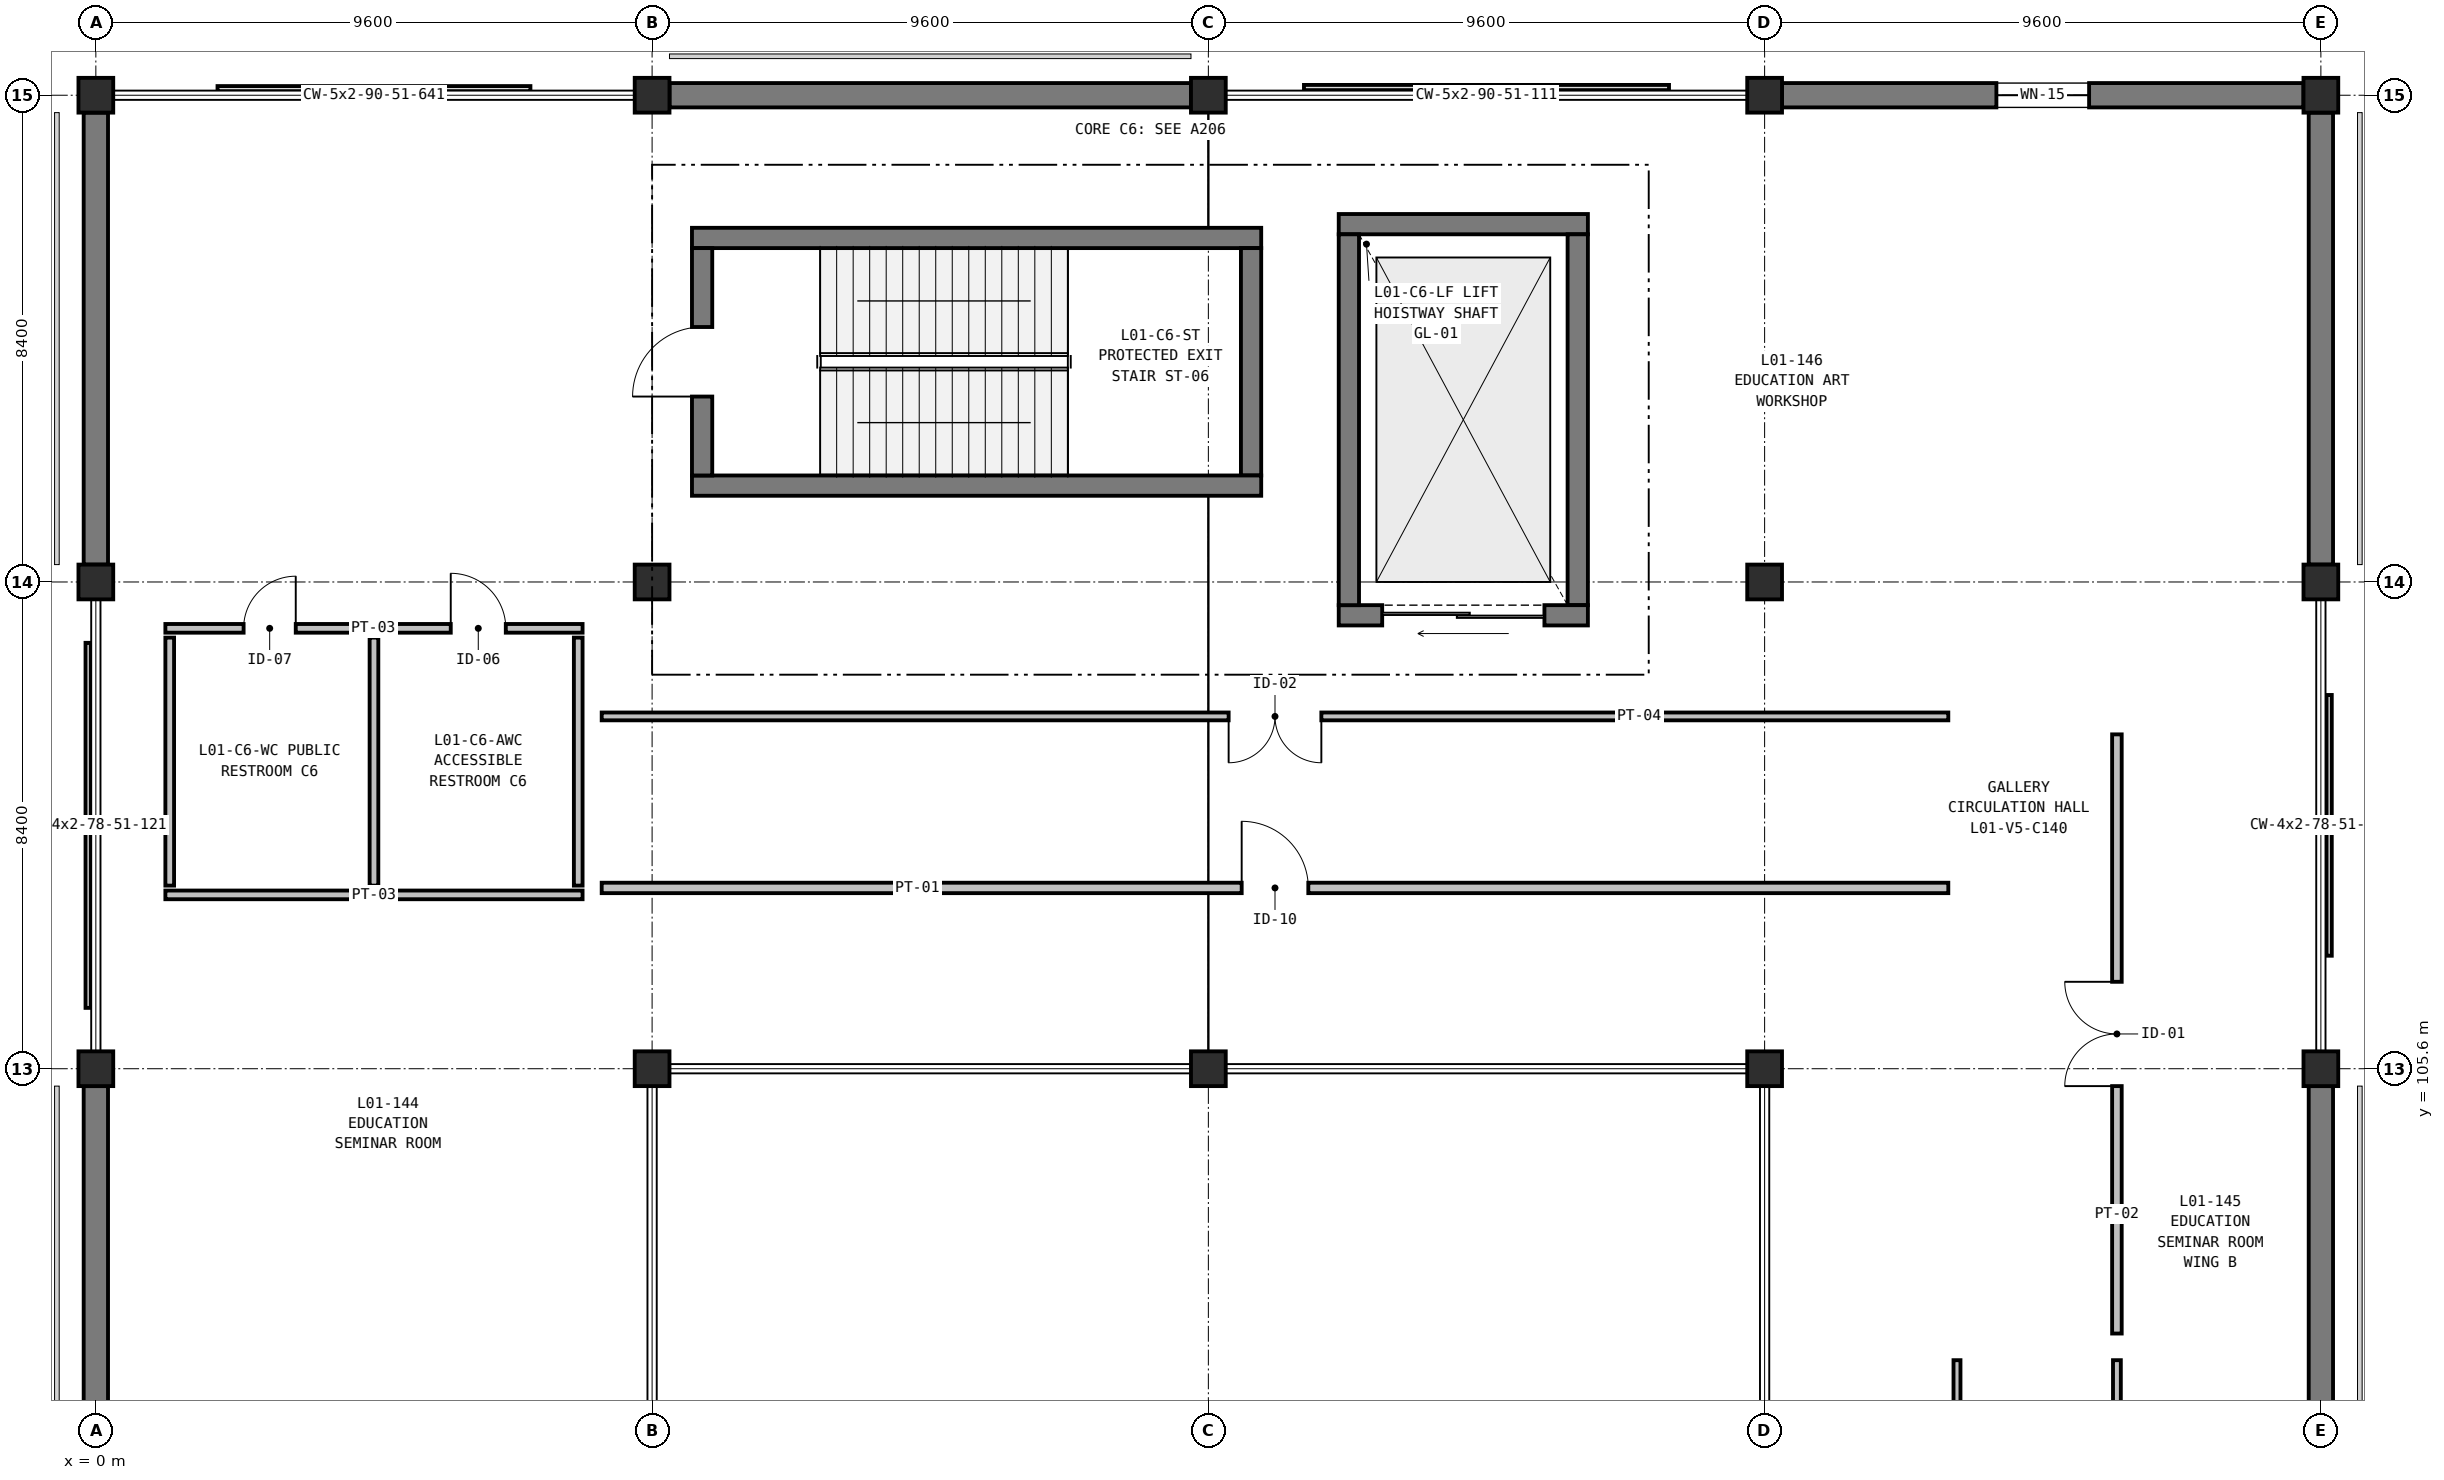
"""IFC4 building model, lengths in metres.
Left out: names, types, materials, properties, quantities, classifications, styles, units other than length and angle.
Written with IfcOpenShell. Run it as: python <this file> out.ifc"""

import sys

from ifc_helpers import new_model, si_unit, direction, frame, frame_2d, origin, origin_2d, place, context, subcontext, project, spatial, rectangle, extrude, element, fill, save


model = new_model("IFC4")
c1 = context("Model", 3, precision=1e-05, world=origin(), true_north=direction((0.0, 1.0)))
c2 = subcontext(c1, "Body", "Model", "MODEL_VIEW")
j1 = project(units=[si_unit("LENGTHUNIT", "METRE"), si_unit("PLANEANGLEUNIT", "RADIAN")], contexts=[c1])
p1 = place(None, origin())
s1 = spatial("IfcSite", under=j1, at=p1, CompositionType="ELEMENT")
p2 = place(p1, origin())
s2 = spatial("IfcBuilding", under=s1, at=p2, CompositionType="ELEMENT")
p3 = place(p2, frame((0.0, 0.0, 6.0)))
s3 = spatial("IfcBuildingStorey", under=s2, at=p3, CompositionType="ELEMENT", Elevation=6.0)
for number, where, z_axis, x_axis in (
    (1, (0.0, 105.6, 0.0), (0.0, 0.0, 1.0), (1.0, 0.0, 0.0)),
    (2, (0.0, 114.0, 0.0), (0.0, 0.0, 1.0), (1.0, 0.0, 0.0)),
    (3, (0.0, 122.4, 0.0), (0.0, 0.0, 1.0), (1.0, 0.0, 0.0)),
    (4, (9.6, 105.6, 0.0), (0.0, 0.0, 1.0), (1.0, 0.0, 0.0)),
    (5, (9.6, 114.0, 0.0), (0.0, 0.0, 1.0), (1.0, 0.0, 0.0)),
    (6, (9.6, 122.4, 0.0), (0.0, 0.0, 1.0), (1.0, 0.0, 0.0)),
    (7, (19.2, 105.6, 0.0), (0.0, 0.0, 1.0), (1.0, 0.0, 0.0)),
    (8, (19.2, 122.4, 0.0), (0.0, 0.0, 1.0), (1.0, 0.0, 0.0)),
    (9, (28.8, 105.6, 0.0), (0.0, 0.0, 1.0), (1.0, 0.0, 0.0)),
    (10, (28.8, 114.0, 0.0), (0.0, 0.0, 1.0), (1.0, 0.0, 0.0)),
    (11, (28.8, 122.4, 0.0), (0.0, 0.0, 1.0), (1.0, 0.0, 0.0)),
    (12, (38.4, 105.6, 0.0), (0.0, 0.0, 1.0), (1.0, 0.0, 0.0)),
    (13, (38.4, 114.0, 0.0), (0.0, 0.0, 1.0), (1.0, 0.0, 0.0)),
    (14, (38.4, 122.4, 0.0), (0.0, 0.0, 1.0), (1.0, 0.0, 0.0)),
):
    element("IfcColumn", number, at=place(p3, frame(where, z_axis=z_axis, x_axis=x_axis)), inside=s3, PredefinedType="COLUMN", context=c2, shape_type="SweptSolid", body=[
        extrude(rectangle(XDim=0.6, YDim=0.6, at=origin_2d()), origin(), (0.0, 0.0, 1.0), 5.4),
    ])
p4 = place(p3, frame((9.9, 122.4, 0.0), z_axis=(0.0, 0.0, 1.0), x_axis=(1.0, 0.0, 0.0)))
e15 = element("IfcWall", 15, at=p4, inside=s3, PredefinedType="SOLIDWALL", context=c2, shape_type="SweptSolid", body=[
    extrude(rectangle(XDim=9.0, YDim=0.42, at=frame_2d((4.5, 0.0))), origin(), (0.0, 0.0, 1.0), 5.08),
])
p5 = place(p3, frame((29.1, 122.4, 0.0), z_axis=(0.0, 0.0, 1.0), x_axis=(1.0, 0.0, 0.0)))
e16 = element("IfcWall", 16, at=p5, inside=s3, PredefinedType="SOLIDWALL", context=c2, shape_type="SweptSolid", body=[
    extrude(rectangle(XDim=9.0, YDim=0.42, at=frame_2d((4.5, 0.0))), origin(), (0.0, 0.0, 1.0), 5.08),
])
p6 = place(p5, frame((3.7, 0.0, 0.9)))
e17 = element("IfcOpeningElement", 17, at=p6, cuts=e16, PredefinedType="OPENING", context=c2, shape_type="SweptSolid", body=[
    extrude(rectangle(XDim=1.6, YDim=2.25, at=frame_2d((0.8, 1.125))), frame((0.0, 0.22, 0.0), z_axis=(0.0, -1.0, 0.0), x_axis=(1.0, 0.0, 0.0)), (0.0, 0.0, 1.0), 0.44),
])
for number, where, z_axis, x_axis in (
    (18, (38.4, 122.1, 0.0), (0.0, 0.0, 1.0), (0.0, -1.0, 0.0)),
    (19, (38.4, 105.3, 0.0), (0.0, 0.0, 1.0), (0.0, -1.0, 0.0)),
    (20, (0.0, 97.5, 0.0), (0.0, 0.0, 1.0), (0.0, 1.0, 0.0)),
    (21, (0.0, 114.3, 0.0), (0.0, 0.0, 1.0), (0.0, 1.0, 0.0)),
):
    element("IfcWall", number, at=place(p3, frame(where, z_axis=z_axis, x_axis=x_axis)), inside=s3, PredefinedType="SOLIDWALL", context=c2, shape_type="SweptSolid", body=[
        extrude(rectangle(XDim=7.8, YDim=0.42, at=frame_2d((3.9, 0.0))), origin(), (0.0, 0.0, 1.0), 5.08),
    ])
p7 = place(p3, frame((10.288, 119.937, 0.0), z_axis=(0.0, 0.0, 1.0), x_axis=(1.0, 0.0, 0.0)))
e22 = element("IfcWall", 22, at=p7, inside=s3, PredefinedType="SHEAR", context=c2, shape_type="SweptSolid", body=[
    extrude(rectangle(XDim=9.824, YDim=0.35, at=frame_2d((4.912, 0.0))), origin(), (0.0, 0.0, 1.0), 5.08),
])
p8 = place(p3, frame((19.937, 119.762, 0.0), z_axis=(0.0, 0.0, 1.0), x_axis=(0.0, -1.0, 0.0)))
e23 = element("IfcWall", 23, at=p8, inside=s3, PredefinedType="SHEAR", context=c2, shape_type="SweptSolid", body=[
    extrude(rectangle(XDim=3.924, YDim=0.35, at=frame_2d((1.962, 0.0))), origin(), (0.0, 0.0, 1.0), 5.08),
])
p9 = place(p3, frame((20.112, 115.663, 0.0), z_axis=(0.0, 0.0, 1.0), x_axis=(-1.0, 0.0, 0.0)))
e24 = element("IfcWall", 24, at=p9, inside=s3, PredefinedType="SHEAR", context=c2, shape_type="SweptSolid", body=[
    extrude(rectangle(XDim=9.824, YDim=0.35, at=frame_2d((4.912, 0.0))), origin(), (0.0, 0.0, 1.0), 5.08),
])
p10 = place(p3, frame((10.463, 115.838, 0.0), z_axis=(0.0, 0.0, 1.0), x_axis=(0.0, 1.0, 0.0)))
e25 = element("IfcWall", 25, at=p10, inside=s3, PredefinedType="SHEAR", context=c2, shape_type="SweptSolid", body=[
    extrude(rectangle(XDim=3.924, YDim=0.35, at=frame_2d((1.962, 0.0))), origin(), (0.0, 0.0, 1.0), 5.08),
])
p11 = place(p10, frame((1.362, 0.0, 0.0)))
e26 = element("IfcOpeningElement", 26, at=p11, cuts=e25, PredefinedType="OPENING", context=c2, shape_type="SweptSolid", body=[
    extrude(rectangle(XDim=1.2, YDim=2.2, at=frame_2d((0.6, 1.1))), frame((0.0, 0.185, 0.0), z_axis=(0.0, -1.0, 0.0), x_axis=(1.0, 0.0, 0.0)), (0.0, 0.0, 1.0), 0.37),
])
p12 = place(p3, frame((21.45, 120.175, 0.0), z_axis=(0.0, 0.0, 1.0), x_axis=(1.0, 0.0, 0.0)))
e27 = element("IfcWall", 27, at=p12, inside=s3, PredefinedType="SHEAR", context=c2, shape_type="SweptSolid", body=[
    extrude(rectangle(XDim=4.3, YDim=0.35, at=frame_2d((2.15, 0.0))), origin(), (0.0, 0.0, 1.0), 5.08),
])
p13 = place(p3, frame((25.575, 120.0, 0.0), z_axis=(0.0, 0.0, 1.0), x_axis=(0.0, -1.0, 0.0)))
e28 = element("IfcWall", 28, at=p13, inside=s3, PredefinedType="SHEAR", context=c2, shape_type="SweptSolid", body=[
    extrude(rectangle(XDim=6.4, YDim=0.35, at=frame_2d((3.2, 0.0))), origin(), (0.0, 0.0, 1.0), 5.08),
])
p14 = place(p3, frame((25.75, 113.425, 0.0), z_axis=(0.0, 0.0, 1.0), x_axis=(-1.0, 0.0, 0.0)))
e29 = element("IfcWall", 29, at=p14, inside=s3, PredefinedType="SHEAR", context=c2, shape_type="SweptSolid", body=[
    extrude(rectangle(XDim=4.3, YDim=0.35, at=frame_2d((2.15, 0.0))), origin(), (0.0, 0.0, 1.0), 5.08),
])
p15 = place(p14, frame((0.75, 0.0, 0.0)))
e30 = element("IfcOpeningElement", 30, at=p15, cuts=e29, PredefinedType="OPENING", context=c2, shape_type="SweptSolid", body=[
    extrude(rectangle(XDim=2.8, YDim=2.7, at=frame_2d((1.4, 1.35))), frame((0.0, 0.185, 0.0), z_axis=(0.0, -1.0, 0.0), x_axis=(1.0, 0.0, 0.0)), (0.0, 0.0, 1.0), 0.37),
])
p16 = place(p3, frame((21.625, 113.6, 0.0), z_axis=(0.0, 0.0, 1.0), x_axis=(0.0, 1.0, 0.0)))
e31 = element("IfcWall", 31, at=p16, inside=s3, PredefinedType="SHEAR", context=c2, shape_type="SweptSolid", body=[
    extrude(rectangle(XDim=6.4, YDim=0.35, at=frame_2d((3.2, 0.0))), origin(), (0.0, 0.0, 1.0), 5.08),
])
p17 = place(p3, frame((1.2, 113.2, 0.0), z_axis=(0.0, 0.0, 1.0), x_axis=(1.0, 0.0, 0.0)))
e32 = element("IfcWall", 32, at=p17, inside=s3, PredefinedType="PARTITIONING", context=c2, shape_type="SweptSolid", body=[
    extrude(rectangle(XDim=7.2, YDim=0.15, at=frame_2d((3.6, 0.0))), origin(), (0.0, 0.0, 1.0), 5.08),
])
p18 = place(p17, frame((1.35, 0.0, 0.0)))
e33 = element("IfcOpeningElement", 33, at=p18, cuts=e32, PredefinedType="OPENING", context=c2, shape_type="SweptSolid", body=[
    extrude(rectangle(XDim=0.9, YDim=2.1, at=frame_2d((0.45, 1.05))), frame((0.0, 0.085, 0.0), z_axis=(0.0, -1.0, 0.0), x_axis=(1.0, 0.0, 0.0)), (0.0, 0.0, 1.0), 0.17),
])
p19 = place(p17, frame((4.925, 0.0, 0.0)))
e34 = element("IfcOpeningElement", 34, at=p19, cuts=e32, PredefinedType="OPENING", context=c2, shape_type="SweptSolid", body=[
    extrude(rectangle(XDim=0.95, YDim=2.15, at=frame_2d((0.475, 1.075))), frame((0.0, 0.085, 0.0), z_axis=(0.0, -1.0, 0.0), x_axis=(1.0, 0.0, 0.0)), (0.0, 0.0, 1.0), 0.17),
])
p20 = place(p3, frame((1.2, 108.6, 0.0), z_axis=(0.0, 0.0, 1.0), x_axis=(1.0, 0.0, 0.0)))
e35 = element("IfcWall", 35, at=p20, inside=s3, PredefinedType="PARTITIONING", context=c2, shape_type="SweptSolid", body=[
    extrude(rectangle(XDim=7.2, YDim=0.15, at=frame_2d((3.6, 0.0))), origin(), (0.0, 0.0, 1.0), 5.08),
])
for number, where, z_axis, x_axis in (
    (36, (1.275, 108.76, 0.0), (0.0, 0.0, 1.0), (0.0, 1.0, 0.0)),
    (37, (4.8, 108.76, 0.0), (0.0, 0.0, 1.0), (0.0, 1.0, 0.0)),
    (38, (8.325, 108.76, 0.0), (0.0, 0.0, 1.0), (0.0, 1.0, 0.0)),
):
    element("IfcWall", number, at=place(p3, frame(where, z_axis=z_axis, x_axis=x_axis)), inside=s3, PredefinedType="PARTITIONING", context=c2, shape_type="SweptSolid", body=[
        extrude(rectangle(XDim=4.28, YDim=0.15, at=frame_2d((2.14, 0.0))), origin(), (0.0, 0.0, 1.0), 4.455),
    ])
p21 = place(p3, frame((34.88, 90.23, 0.0), z_axis=(0.0, 0.0, 1.0), x_axis=(0.0, 1.0, 0.0)))
e39 = element("IfcWall", 39, at=p21, inside=s3, PredefinedType="PARTITIONING", context=c2, shape_type="SweptSolid", body=[
    extrude(rectangle(XDim=10.34, YDim=0.135, at=frame_2d((5.17, 0.0))), origin(), (0.0, 0.0, 1.0), 4.305),
])
p22 = place(p21, frame((3.97, 0.0, 0.0)))
e40 = element("IfcOpeningElement", 40, at=p22, cuts=e39, PredefinedType="OPENING", context=c2, shape_type="SweptSolid", body=[
    extrude(rectangle(XDim=2.4, YDim=2.6, at=frame_2d((1.2, 1.3))), frame((0.0, 0.077, 0.0), z_axis=(0.0, -1.0, 0.0), x_axis=(1.0, 0.0, 0.0)), (0.0, 0.0, 1.0), 0.155),
])
p23 = place(p3, frame((32.12, 100.57, 0.0), z_axis=(0.0, 0.0, 1.0), x_axis=(0.0, -1.0, 0.0)))
e41 = element("IfcWall", 41, at=p23, inside=s3, PredefinedType="PARTITIONING", context=c2, shape_type="SweptSolid", body=[
    extrude(rectangle(XDim=10.34, YDim=0.12, at=frame_2d((5.17, 0.0))), origin(), (0.0, 0.0, 1.0), 4.305),
])
p24 = place(p23, frame((4.42, 0.0, 0.0)))
e42 = element("IfcOpeningElement", 42, at=p24, cuts=e41, PredefinedType="OPENING", context=c2, shape_type="SweptSolid", body=[
    extrude(rectangle(XDim=1.5, YDim=2.3, at=frame_2d((0.75, 1.15))), frame((0.0, 0.07, 0.0), z_axis=(0.0, -1.0, 0.0), x_axis=(1.0, 0.0, 0.0)), (0.0, 0.0, 1.0), 0.14),
])
p25 = place(p3, frame((8.73, 108.72, 0.0), z_axis=(0.0, 0.0, 1.0), x_axis=(1.0, 0.0, 0.0)))
e43 = element("IfcWall", 43, at=p25, inside=s3, PredefinedType="PARTITIONING", context=c2, shape_type="SweptSolid", body=[
    extrude(rectangle(XDim=23.24, YDim=0.18, at=frame_2d((11.62, 0.0))), origin(), (0.0, 0.0, 1.0), 4.355),
])
p26 = place(p25, frame((11.045, 0.0, 0.0)))
e44 = element("IfcOpeningElement", 44, at=p26, cuts=e43, PredefinedType="OPENING", context=c2, shape_type="SweptSolid", body=[
    extrude(rectangle(XDim=1.15, YDim=2.2, at=frame_2d((0.575, 1.1))), frame((0.0, 0.1, 0.0), z_axis=(0.0, -1.0, 0.0), x_axis=(1.0, 0.0, 0.0)), (0.0, 0.0, 1.0), 0.2),
])
p27 = place(p3, frame((34.88, 101.03, 0.0), z_axis=(0.0, 0.0, 1.0), x_axis=(0.0, 1.0, 0.0)))
e45 = element("IfcWall", 45, at=p27, inside=s3, PredefinedType="PARTITIONING", context=c2, shape_type="SweptSolid", body=[
    extrude(rectangle(XDim=10.34, YDim=0.165, at=frame_2d((5.17, 0.0))), origin(), (0.0, 0.0, 1.0), 4.305),
])
p28 = place(p27, frame((4.27, 0.0, 0.0)))
e46 = element("IfcOpeningElement", 46, at=p28, cuts=e45, PredefinedType="OPENING", context=c2, shape_type="SweptSolid", body=[
    extrude(rectangle(XDim=1.8, YDim=2.4, at=frame_2d((0.9, 1.2))), frame((0.0, 0.093, 0.0), z_axis=(0.0, -1.0, 0.0), x_axis=(1.0, 0.0, 0.0)), (0.0, 0.0, 1.0), 0.185),
])
p29 = place(p3, frame((31.97, 111.68, 0.0), z_axis=(0.0, 0.0, 1.0), x_axis=(-1.0, 0.0, 0.0)))
e47 = element("IfcWall", 47, at=p29, inside=s3, PredefinedType="PARTITIONING", context=c2, shape_type="SweptSolid", body=[
    extrude(rectangle(XDim=23.24, YDim=0.135, at=frame_2d((11.62, 0.0))), origin(), (0.0, 0.0, 1.0), 4.355),
])
p30 = place(p29, frame((10.82, 0.0, 0.0)))
e48 = element("IfcOpeningElement", 48, at=p30, cuts=e47, PredefinedType="OPENING", context=c2, shape_type="SweptSolid", body=[
    extrude(rectangle(XDim=1.6, YDim=2.35, at=frame_2d((0.8, 1.175))), frame((0.0, 0.077, 0.0), z_axis=(0.0, -1.0, 0.0), x_axis=(1.0, 0.0, 0.0)), (0.0, 0.0, 1.0), 0.155),
])
p31 = place(p6, origin())
e49 = element("IfcWindow", 49, at=p31, inside=s3, PartitioningType="SINGLE_PANEL", PredefinedType="WINDOW", context=c2, shape_type="SweptSolid", body=[
    extrude(rectangle(XDim=1.6, YDim=2.25, at=frame_2d((0.8, 1.125))), frame((0.0, 0.03, 0.0), z_axis=(0.0, -1.0, 0.0), x_axis=(1.0, 0.0, 0.0)), (0.0, 0.0, 1.0), 0.06),
])
fill(e17, e49)
p32 = place(p11, origin())
e50 = element("IfcDoor", 50, at=p32, inside=s3, OperationType="SINGLE_SWING_LEFT", PredefinedType="DOOR", context=c2, shape_type="SweptSolid", body=[
    extrude(rectangle(XDim=1.2, YDim=2.2, at=frame_2d((0.6, 1.1))), frame((0.0, 0.025, 0.0), z_axis=(0.0, -1.0, 0.0), x_axis=(1.0, 0.0, 0.0)), (0.0, 0.0, 1.0), 0.05),
])
fill(e26, e50)
p33 = place(p15, origin())
e51 = element("IfcDoor", 51, at=p33, inside=s3, OperationType="DOUBLE_DOOR_SLIDING", PredefinedType="DOOR", context=c2, shape_type="SweptSolid", body=[
    extrude(rectangle(XDim=2.8, YDim=2.7, at=frame_2d((1.4, 1.35))), frame((0.0, 0.025, 0.0), z_axis=(0.0, -1.0, 0.0), x_axis=(1.0, 0.0, 0.0)), (0.0, 0.0, 1.0), 0.05),
])
fill(e30, e51)
p34 = place(p18, origin())
e52 = element("IfcDoor", 52, at=p34, inside=s3, OperationType="SINGLE_SWING_RIGHT", PredefinedType="DOOR", context=c2, shape_type="SweptSolid", body=[
    extrude(rectangle(XDim=0.9, YDim=2.1, at=frame_2d((0.45, 1.05))), frame((0.0, 0.025, 0.0), z_axis=(0.0, -1.0, 0.0), x_axis=(1.0, 0.0, 0.0)), (0.0, 0.0, 1.0), 0.05),
])
fill(e33, e52)
p35 = place(p19, origin())
e53 = element("IfcDoor", 53, at=p35, inside=s3, OperationType="SINGLE_SWING_LEFT", PredefinedType="DOOR", context=c2, shape_type="SweptSolid", body=[
    extrude(rectangle(XDim=0.95, YDim=2.15, at=frame_2d((0.475, 1.075))), frame((0.0, 0.025, 0.0), z_axis=(0.0, -1.0, 0.0), x_axis=(1.0, 0.0, 0.0)), (0.0, 0.0, 1.0), 0.05),
])
fill(e34, e53)
p36 = place(p26, origin())
e54 = element("IfcDoor", 54, at=p36, inside=s3, OperationType="SINGLE_SWING_LEFT", PredefinedType="DOOR", context=c2, shape_type="SweptSolid", body=[
    extrude(rectangle(XDim=1.15, YDim=2.2, at=frame_2d((0.575, 1.1))), frame((0.0, 0.025, 0.0), z_axis=(0.0, -1.0, 0.0), x_axis=(1.0, 0.0, 0.0)), (0.0, 0.0, 1.0), 0.05),
])
fill(e44, e54)
p37 = place(p28, origin())
e55 = element("IfcDoor", 55, at=p37, inside=s3, OperationType="DOUBLE_DOOR_SINGLE_SWING", PredefinedType="DOOR", context=c2, shape_type="SweptSolid", body=[
    extrude(rectangle(XDim=1.8, YDim=2.4, at=frame_2d((0.9, 1.2))), frame((0.0, 0.025, 0.0), z_axis=(0.0, -1.0, 0.0), x_axis=(1.0, 0.0, 0.0)), (0.0, 0.0, 1.0), 0.05),
])
fill(e46, e55)
p38 = place(p30, origin())
e56 = element("IfcDoor", 56, at=p38, inside=s3, OperationType="DOUBLE_DOOR_SINGLE_SWING", PredefinedType="DOOR", context=c2, shape_type="SweptSolid", body=[
    extrude(rectangle(XDim=1.6, YDim=2.35, at=frame_2d((0.8, 1.175))), frame((0.0, 0.025, 0.0), z_axis=(0.0, -1.0, 0.0), x_axis=(1.0, 0.0, 0.0)), (0.0, 0.0, 1.0), 0.05),
])
fill(e48, e56)
save(model, sys.argv[1])
